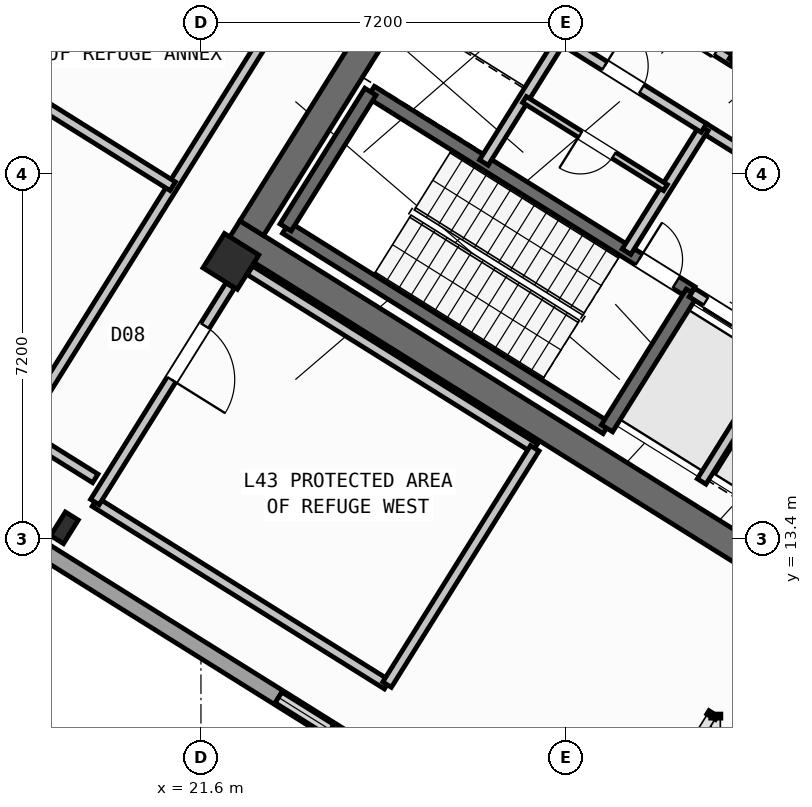
"""IFC4 building model, lengths in metres.
Left out: names, types, materials, properties, quantities, classifications, styles, units other than length and angle.
Written with IfcOpenShell. Run it as: python <this file> out.ifc"""

import sys

from ifc_helpers import new_model, si_unit, direction, frame, frame_2d, origin, origin_2d, place, context, subcontext, project, spatial, rectangle, hollow_rectangle, i_section, extrude, source, transform, mapped, element, fill, save


model = new_model("IFC4")
c1 = context("Model", 3, precision=1e-05, world=origin(), true_north=direction((0.0, 1.0)))
c2 = subcontext(c1, "Body", "Model", "MODEL_VIEW")
j1 = project(units=[si_unit("LENGTHUNIT", "METRE"), si_unit("PLANEANGLEUNIT", "RADIAN")], contexts=[c1])
p1 = place(None, origin())
s1 = spatial("IfcSite", under=j1, at=p1, CompositionType="ELEMENT")
p2 = place(p1, origin())
s2 = spatial("IfcBuilding", under=s1, at=p2, CompositionType="ELEMENT")
p3 = place(p2, frame((0.0, 0.0, 169.5)))
s3 = spatial("IfcBuildingStorey", under=s2, at=p3, CompositionType="ELEMENT", Elevation=169.5)
p4 = place(p3, frame((33.366, 12.477, 0.0), z_axis=(0.0, 0.0, 1.0), x_axis=(-0.848047359947, 0.529920442413, 0.0)))
e1 = element("IfcWall", 1, at=p4, inside=s3, PredefinedType="SHEAR", context=c2, shape_type="SweptSolid", body=[
    extrude(rectangle(XDim=13.14, YDim=0.55, at=frame_2d((6.57, 0.0))), origin(), (0.0, 0.0, 1.0), 5.15),
])
p5 = place(p3, frame((26.007, 24.976, 0.0), z_axis=(0.0, 0.0, 1.0), x_axis=(-0.529923795287, -0.848045264823, 0.0)))
e2 = element("IfcWall", 2, at=p5, inside=s3, PredefinedType="SHEAR", context=c2, shape_type="SweptSolid", body=[
    extrude(rectangle(XDim=6.425, YDim=0.55, at=frame_2d((3.212, 0.0))), origin(), (0.0, 0.0, 1.0), 5.15),
])
m1 = source(origin(), c2, "Body", "SweptSolid", [
    extrude(hollow_rectangle(XDim=0.8, YDim=0.8, WallThickness=0.032, at=origin_2d()), origin(), (0.0, 0.0, 1.0), 5.4),
])
p6 = place(p3, frame((22.191, 18.87, 0.0), z_axis=(0.0, 0.0, 1.0), x_axis=(-0.848048096156, 0.529919264233, 0.0)))
e3 = element("IfcColumn", 3, at=p6, inside=s3, PredefinedType="COLUMN", context=c2, shape_type="MappedRepresentation", body=[
    mapped(m1, transform((0.0, 0.0, 0.0), scale=1.0)),
])
m2 = source(origin(), c2, "Body", "SweptSolid", [
    extrude(i_section(OverallWidth=0.3, OverallDepth=0.55, WebThickness=0.015, FlangeThickness=0.029, at=origin_2d()), origin(), (0.0, 0.0, 1.0), 5.4),
])
p7 = place(p3, frame((18.906, 13.612, 0.0), z_axis=(0.0, 0.0, 1.0), x_axis=(-0.848048096156, 0.529919264233, 0.0)))
e4 = element("IfcColumn", 4, at=p7, inside=s3, PredefinedType="COLUMN", context=c2, shape_type="MappedRepresentation", body=[
    mapped(m2, transform((0.0, 0.0, 0.0), scale=1.0)),
])
p8 = place(p3, frame((29.268, 6.429, 0.0), z_axis=(0.0, 0.0, 1.0), x_axis=(-0.848049971435, 0.529916263149, 0.0)))
e5 = element("IfcWall", 5, at=p8, inside=s3, PredefinedType="STANDARD", context=c2, shape_type="SweptSolid", body=[
    extrude(rectangle(XDim=31.588, YDim=0.32, at=frame_2d((15.794, 0.0))), origin(), (0.0, 0.0, 1.0), 5.15),
])
p9 = place(p8, frame((6.007, 0.0, 0.95)))
e6 = element("IfcOpeningElement", 6, at=p9, cuts=e5, PredefinedType="OPENING", context=c2, shape_type="SweptSolid", body=[
    extrude(rectangle(XDim=1.25, YDim=1.4, at=frame_2d((0.625, 0.7))), frame((0.0, 0.17, 0.0), z_axis=(0.0, -1.0, 0.0), x_axis=(1.0, 0.0, 0.0)), (0.0, 0.0, 1.0), 0.34),
])
p10 = place(p3, frame((29.605, 15.581, 0.0), z_axis=(0.0, 0.0, 1.0), x_axis=(-0.848036911448, 0.529937163087, 0.0)))
e7 = element("IfcWall", 7, at=p10, inside=s3, PredefinedType="SHEAR", context=c2, shape_type="SweptSolid", body=[
    extrude(rectangle(XDim=7.46, YDim=0.26, at=frame_2d((3.73, 0.0))), origin(), (0.0, 0.0, 1.0), 5.15),
])
p11 = place(p3, frame((31.28, 18.261, 0.0), z_axis=(0.0, 0.0, 1.0), x_axis=(-0.848051618787, 0.529913626805, 0.0)))
e8 = element("IfcWall", 8, at=p11, inside=s3, PredefinedType="SHEAR", context=c2, shape_type="SweptSolid", body=[
    extrude(rectangle(XDim=7.46, YDim=0.26, at=frame_2d((3.73, 0.0))), origin(), (0.0, 0.0, 1.0), 5.15),
])
p12 = place(p11, frame((0.36, 0.0, 0.0)))
e9 = element("IfcOpeningElement", 9, at=p12, cuts=e8, PredefinedType="OPENING", context=c2, shape_type="SweptSolid", body=[
    extrude(rectangle(XDim=0.86, YDim=2.05, at=frame_2d((0.43, 1.025))), frame((0.0, 0.14, 0.0), z_axis=(0.0, -1.0, 0.0), x_axis=(1.0, 0.0, 0.0)), (0.0, 0.0, 1.0), 0.28),
])
p13 = place(p3, frame((31.288, 18.256, 0.0), z_axis=(0.0, 0.0, 1.0), x_axis=(-0.529943379326, -0.848033026897, 0.0)))
e10 = element("IfcWall", 10, at=p13, inside=s3, PredefinedType="SHEAR", context=c2, shape_type="SweptSolid", body=[
    extrude(rectangle(XDim=3.16, YDim=0.26, at=frame_2d((1.58, 0.0))), origin(), (0.0, 0.0, 1.0), 5.15),
])
p14 = place(p3, frame((24.945, 22.22, 0.0), z_axis=(0.0, 0.0, 1.0), x_axis=(-0.529908658664, -0.84805472316, 0.0)))
e11 = element("IfcWall", 11, at=p14, inside=s3, PredefinedType="SHEAR", context=c2, shape_type="SweptSolid", body=[
    extrude(rectangle(XDim=3.16, YDim=0.26, at=frame_2d((1.58, 0.0))), origin(), (0.0, 0.0, 1.0), 5.15),
])
p15 = place(p3, frame((38.046, 21.108, 0.0), z_axis=(0.0, 0.0, 1.0), x_axis=(-0.848054434086, 0.529909121291, 0.0)))
e12 = element("IfcWall", 12, at=p15, inside=s3, PredefinedType="SHEAR", context=c2, shape_type="SweptSolid", body=[
    extrude(rectangle(XDim=7.33, YDim=0.26, at=frame_2d((3.665, 0.0))), origin(), (0.0, 0.0, 1.0), 5.15),
])
p16 = place(p15, frame((0.22, 0.0, 0.0)))
e13 = element("IfcOpeningElement", 13, at=p16, cuts=e12, PredefinedType="OPENING", context=c2, shape_type="SweptSolid", body=[
    extrude(rectangle(XDim=1.1, YDim=2.1, at=frame_2d((0.55, 1.05))), frame((0.0, 0.14, 0.0), z_axis=(0.0, -1.0, 0.0), x_axis=(1.0, 0.0, 0.0)), (0.0, 0.0, 1.0), 0.28),
])
p17 = place(p3, frame((34.891, 16.005, 0.0), z_axis=(0.0, 0.0, 1.0), x_axis=(-0.848062873452, 0.529895614884, 0.0)))
e14 = element("IfcWall", 14, at=p17, inside=s3, PredefinedType="STANDARD", context=c2, shape_type="SweptSolid", body=[
    extrude(rectangle(XDim=4.248, YDim=0.2, at=frame_2d((2.124, 0.0))), origin(), (0.0, 0.0, 1.0), 5.14),
])
p18 = place(p17, frame((0.398, 0.0, 0.0)))
e15 = element("IfcOpeningElement", 15, at=p18, cuts=e14, PredefinedType="OPENING", context=c2, shape_type="SweptSolid", body=[
    extrude(rectangle(XDim=1.3, YDim=2.2, at=frame_2d((0.65, 1.1))), frame((0.0, 0.11, 0.0), z_axis=(0.0, -1.0, 0.0), x_axis=(1.0, 0.0, 0.0)), (0.0, 0.0, 1.0), 0.22),
])
p19 = place(p17, frame((2.473, 0.0, 0.0)))
e16 = element("IfcOpeningElement", 16, at=p19, cuts=e14, PredefinedType="OPENING", context=c2, shape_type="SweptSolid", body=[
    extrude(rectangle(XDim=1.45, YDim=2.25, at=frame_2d((0.725, 1.125))), frame((0.0, 0.11, 0.0), z_axis=(0.0, -1.0, 0.0), x_axis=(1.0, 0.0, 0.0)), (0.0, 0.0, 1.0), 0.22),
])
p20 = place(p3, frame((36.417, 18.447, 0.0), z_axis=(0.0, 0.0, 1.0), x_axis=(-0.848064879198, 0.529892404805, 0.0)))
e17 = element("IfcWall", 17, at=p20, inside=s3, PredefinedType="STANDARD", context=c2, shape_type="SweptSolid", body=[
    extrude(rectangle(XDim=5.768, YDim=0.2, at=frame_2d((2.884, 0.0))), origin(), (0.0, 0.0, 1.0), 5.14),
])
p21 = place(p20, frame((2.548, 0.0, 0.0)))
e18 = element("IfcOpeningElement", 18, at=p21, cuts=e17, PredefinedType="OPENING", context=c2, shape_type="SweptSolid", body=[
    extrude(rectangle(XDim=1.15, YDim=2.1, at=frame_2d((0.575, 1.05))), frame((0.0, 0.11, 0.0), z_axis=(0.0, -1.0, 0.0), x_axis=(1.0, 0.0, 0.0)), (0.0, 0.0, 1.0), 0.22),
])
p22 = place(p3, frame((32.108, 22.814, 0.0), z_axis=(0.0, 0.0, 1.0), x_axis=(-0.848042229521, 0.529928652696, 0.0)))
e19 = element("IfcWall", 19, at=p22, inside=s3, PredefinedType="STANDARD", context=c2, shape_type="SweptSolid", body=[
    extrude(rectangle(XDim=5.62, YDim=0.2, at=frame_2d((2.81, 0.0))), origin(), (0.0, 0.0, 1.0), 5.14),
])
p23 = place(p22, frame((0.39, 0.0, 0.0)))
e20 = element("IfcOpeningElement", 20, at=p23, cuts=e19, PredefinedType="OPENING", context=c2, shape_type="SweptSolid", body=[
    extrude(rectangle(XDim=1.1, YDim=2.15, at=frame_2d((0.55, 1.075))), frame((0.0, 0.11, 0.0), z_axis=(0.0, -1.0, 0.0), x_axis=(1.0, 0.0, 0.0)), (0.0, 0.0, 1.0), 0.22),
])
p24 = place(p22, frame((2.25, 0.0, 0.0)))
e21 = element("IfcOpeningElement", 21, at=p24, cuts=e19, PredefinedType="OPENING", context=c2, shape_type="SweptSolid", body=[
    extrude(rectangle(XDim=1.1, YDim=2.15, at=frame_2d((0.55, 1.075))), frame((0.0, 0.11, 0.0), z_axis=(0.0, -1.0, 0.0), x_axis=(1.0, 0.0, 0.0)), (0.0, 0.0, 1.0), 0.22),
])
p25 = place(p22, frame((4.11, 0.0, 0.0)))
e22 = element("IfcOpeningElement", 22, at=p25, cuts=e19, PredefinedType="OPENING", context=c2, shape_type="SweptSolid", body=[
    extrude(rectangle(XDim=1.1, YDim=2.15, at=frame_2d((0.55, 1.075))), frame((0.0, 0.11, 0.0), z_axis=(0.0, -1.0, 0.0), x_axis=(1.0, 0.0, 0.0)), (0.0, 0.0, 1.0), 0.22),
])
p26 = place(p3, frame((32.982, 24.213, 0.0), z_axis=(0.0, 0.0, 1.0), x_axis=(-0.529839334948, -0.84809803628, 0.0)))
e23 = element("IfcWall", 23, at=p26, inside=s3, PredefinedType="STANDARD", context=c2, shape_type="SweptSolid", body=[
    extrude(rectangle(XDim=1.65, YDim=0.2, at=frame_2d((0.825, 0.0))), origin(), (0.0, 0.0, 1.0), 5.14),
])
p27 = place(p3, frame((33.029, 17.003, 0.0), z_axis=(0.0, 0.0, 1.0), x_axis=(-0.529916267533, -0.848049968695, 0.0)))
e24 = element("IfcWall", 24, at=p27, inside=s3, PredefinedType="STANDARD", context=c2, shape_type="SweptSolid", body=[
    extrude(rectangle(XDim=2.92, YDim=0.2, at=frame_2d((1.46, 0.0))), origin(), (0.0, 0.0, 1.0), 5.14),
])
for number, where, z_axis, x_axis in (
    (25, (31.525, 21.504, 0.0), (0.0, 0.0, 1.0), (-0.53, -0.848, 0.0)),
    (26, (28.71, 23.263, 0.0), (0.0, 0.0, 1.0), (-0.53, -0.848, 0.0)),
):
    element("IfcWall", number, at=place(p3, frame(where, z_axis=z_axis, x_axis=x_axis)), inside=s3, PredefinedType="STANDARD", context=c2, shape_type="SweptSolid", body=[
        extrude(rectangle(XDim=2.88, YDim=0.2, at=frame_2d((1.44, 0.0))), origin(), (0.0, 0.0, 1.0), 5.14),
    ])
p28 = place(p3, frame((31.525, 21.504, 0.0), z_axis=(0.0, 0.0, 1.0), x_axis=(-0.848040211232, 0.529931882541, 0.0)))
e27 = element("IfcWall", 27, at=p28, inside=s3, PredefinedType="STANDARD", context=c2, shape_type="SweptSolid", body=[
    extrude(rectangle(XDim=6.218, YDim=0.2, at=frame_2d((3.109, 0.0))), origin(), (0.0, 0.0, 1.0), 5.14),
])
p29 = place(p28, frame((4.4, 0.0, 0.0)))
e28 = element("IfcOpeningElement", 28, at=p29, cuts=e27, PredefinedType="OPENING", context=c2, shape_type="SweptSolid", body=[
    extrude(rectangle(XDim=0.86, YDim=2.05, at=frame_2d((0.43, 1.025))), frame((0.0, 0.11, 0.0), z_axis=(0.0, -1.0, 0.0), x_axis=(1.0, 0.0, 0.0)), (0.0, 0.0, 1.0), 0.22),
])
p30 = place(p28, frame((1.45, 0.0, 0.0)))
e29 = element("IfcOpeningElement", 29, at=p30, cuts=e27, PredefinedType="OPENING", context=c2, shape_type="SweptSolid", body=[
    extrude(rectangle(XDim=0.86, YDim=2.05, at=frame_2d((0.43, 1.025))), frame((0.0, 0.11, 0.0), z_axis=(0.0, -1.0, 0.0), x_axis=(1.0, 0.0, 0.0)), (0.0, 0.0, 1.0), 0.22),
])
p31 = place(p3, frame((30.766, 20.327, 0.0), z_axis=(0.0, 0.0, 1.0), x_axis=(-0.848052663127, 0.529911955482, 0.0)))
e30 = element("IfcWall", 30, at=p31, inside=s3, PredefinedType="PLUMBINGWALL", context=c2, shape_type="SweptSolid", body=[
    extrude(rectangle(XDim=3.28, YDim=0.14, at=frame_2d((1.64, 0.0))), origin(), (0.0, 0.0, 1.0), 5.14),
])
p32 = place(p31, frame((1.2, 0.0, 0.0)))
e31 = element("IfcOpeningElement", 31, at=p32, cuts=e30, PredefinedType="OPENING", context=c2, shape_type="SweptSolid", body=[
    extrude(rectangle(XDim=0.78, YDim=2.05, at=frame_2d((0.39, 1.025))), frame((0.0, 0.08, 0.0), z_axis=(0.0, -1.0, 0.0), x_axis=(1.0, 0.0, 0.0)), (0.0, 0.0, 1.0), 0.16),
])
p33 = place(p3, frame((28.188, 15.182, 0.0), z_axis=(0.0, 0.0, 1.0), x_axis=(-0.848064515696, 0.529892986571, 0.0)))
e32 = element("IfcWall", 32, at=p33, inside=s3, PredefinedType="STANDARD", context=c2, shape_type="SweptSolid", body=[
    extrude(rectangle(XDim=6.628, YDim=0.2, at=frame_2d((3.314, 0.0))), origin(), (0.0, 0.0, 1.0), 5.14),
])
p34 = place(p3, frame((25.273, 10.517, 0.0), z_axis=(0.0, 0.0, 1.0), x_axis=(-0.848048724775, 0.529918258231, 0.0)))
e33 = element("IfcWall", 33, at=p34, inside=s3, PredefinedType="STANDARD", context=c2, shape_type="SweptSolid", body=[
    extrude(rectangle(XDim=6.8, YDim=0.2, at=frame_2d((3.4, 0.0))), origin(), (0.0, 0.0, 1.0), 5.14),
])
p35 = place(p3, frame((28.188, 15.182, 0.0), z_axis=(0.0, 0.0, 1.0), x_axis=(-0.52991514706, -0.848050668838, 0.0)))
e34 = element("IfcWall", 34, at=p35, inside=s3, PredefinedType="STANDARD", context=c2, shape_type="SweptSolid", body=[
    extrude(rectangle(XDim=5.5, YDim=0.2, at=frame_2d((2.75, 0.0))), origin(), (0.0, 0.0, 1.0), 5.14),
])
p36 = place(p3, frame((22.176, 18.393, 0.0), z_axis=(0.0, 0.0, 1.0), x_axis=(-0.529911817823, -0.848052749145, 0.0)))
e35 = element("IfcWall", 35, at=p36, inside=s3, PredefinedType="STANDARD", context=c2, shape_type="SweptSolid", body=[
    extrude(rectangle(XDim=5.038, YDim=0.2, at=frame_2d((2.519, 0.0))), origin(), (0.0, 0.0, 1.0), 4.625),
])
p37 = place(p36, frame((0.938, 0.0, 0.0)))
e36 = element("IfcOpeningElement", 36, at=p37, cuts=e35, PredefinedType="OPENING", context=c2, shape_type="SweptSolid", body=[
    extrude(rectangle(XDim=1.25, YDim=2.15, at=frame_2d((0.625, 1.075))), frame((0.0, 0.11, 0.0), z_axis=(0.0, -1.0, 0.0), x_axis=(1.0, 0.0, 0.0)), (0.0, 0.0, 1.0), 0.22),
])
p38 = place(p3, frame((19.515, 14.587, 0.0), z_axis=(0.0, 0.0, 1.0), x_axis=(-0.848076222107, 0.529874250646, 0.0)))
e37 = element("IfcWall", 37, at=p38, inside=s3, PredefinedType="STANDARD", context=c2, shape_type="SweptSolid", body=[
    extrude(rectangle(XDim=1.76, YDim=0.2, at=frame_2d((0.88, 0.0))), origin(), (0.0, 0.0, 1.0), 5.14),
])
p39 = place(p3, frame((23.666, 24.552, 0.0), z_axis=(0.0, 0.0, 1.0), x_axis=(-0.529912392506, -0.848052390049, 0.0)))
e38 = element("IfcWall", 38, at=p39, inside=s3, PredefinedType="STANDARD", context=c2, shape_type="SweptSolid", body=[
    extrude(rectangle(XDim=10.65, YDim=0.2, at=frame_2d((5.325, 0.0))), origin(), (0.0, 0.0, 1.0), 5.14),
])
p40 = place(p3, frame((19.731, 27.01, 0.0), z_axis=(0.0, 0.0, 1.0), x_axis=(-0.529896970672, -0.848062026312, 0.0)))
e39 = element("IfcWall", 39, at=p40, inside=s3, PredefinedType="STANDARD", context=c2, shape_type="SweptSolid", body=[
    extrude(rectangle(XDim=4.95, YDim=0.2, at=frame_2d((2.475, 0.0))), origin(), (0.0, 0.0, 1.0), 4.625),
])
p41 = place(p3, frame((21.043, 20.354, 0.0), z_axis=(0.0, 0.0, 1.0), x_axis=(-0.848045364107, 0.529923636401, 0.0)))
e40 = element("IfcWall", 40, at=p41, inside=s3, PredefinedType="STANDARD", context=c2, shape_type="SweptSolid", body=[
    extrude(rectangle(XDim=10.2, YDim=0.2, at=frame_2d((5.1, 0.0))), origin(), (0.0, 0.0, 1.0), 5.14),
])
m3 = source(origin(), c2, "Body", "SweptSolid", [
    extrude(rectangle(XDim=1.25, YDim=1.4, at=frame_2d((0.625, 0.7))), frame((0.0, 0.03, 0.0), z_axis=(0.0, -1.0, 0.0), x_axis=(1.0, 0.0, 0.0)), (0.0, 0.0, 1.0), 0.06),
])
p42 = place(p9, origin())
e41 = element("IfcWindow", 41, at=p42, inside=s3, PartitioningType="SINGLE_PANEL", PredefinedType="WINDOW", context=c2, shape_type="MappedRepresentation", body=[
    mapped(m3, transform((0.0, 0.0, 0.0), scale=1.0)),
])
fill(e6, e41)
m4 = source(origin(), c2, "Body", "SweptSolid", [
    extrude(rectangle(XDim=0.86, YDim=2.05, at=frame_2d((0.43, 1.025))), frame((0.0, 0.025, 0.0), z_axis=(0.0, -1.0, 0.0), x_axis=(1.0, 0.0, 0.0)), (0.0, 0.0, 1.0), 0.05),
])
p43 = place(p12, frame((0.86, 0.0, 0.0), z_axis=(0.0, 0.0, 1.0), x_axis=(-1.0, 0.0, 0.0)))
e42 = element("IfcDoor", 42, at=p43, inside=s3, OperationType="SINGLE_SWING_LEFT", PredefinedType="DOOR", context=c2, shape_type="MappedRepresentation", body=[
    mapped(m4, transform((0.0, 0.0, 0.0), scale=1.0)),
])
fill(e9, e42)
m5 = source(origin(), c2, "Body", "SweptSolid", [
    extrude(rectangle(XDim=1.45, YDim=2.25, at=frame_2d((0.725, 1.125))), frame((0.0, 0.025, 0.0), z_axis=(0.0, -1.0, 0.0), x_axis=(1.0, 0.0, 0.0)), (0.0, 0.0, 1.0), 0.05),
])
p44 = place(p19, origin())
e43 = element("IfcDoor", 43, at=p44, inside=s3, OperationType="DOUBLE_DOOR_SLIDING", PredefinedType="DOOR", context=c2, shape_type="MappedRepresentation", body=[
    mapped(m5, transform((0.0, 0.0, 0.0), scale=1.0)),
])
fill(e16, e43)
p45 = place(p30, frame((0.86, 0.0, 0.0), z_axis=(0.0, 0.0, 1.0), x_axis=(-1.0, 0.0, 0.0)))
e44 = element("IfcDoor", 44, at=p45, inside=s3, OperationType="SINGLE_SWING_LEFT", PredefinedType="DOOR", context=c2, shape_type="MappedRepresentation", body=[
    mapped(m4, transform((0.0, 0.0, 0.0), scale=1.0)),
])
fill(e29, e44)
m6 = source(origin(), c2, "Body", "SweptSolid", [
    extrude(rectangle(XDim=0.78, YDim=2.05, at=frame_2d((0.39, 1.025))), frame((0.0, 0.025, 0.0), z_axis=(0.0, -1.0, 0.0), x_axis=(1.0, 0.0, 0.0)), (0.0, 0.0, 1.0), 0.05),
])
p46 = place(p32, origin())
e45 = element("IfcDoor", 45, at=p46, inside=s3, OperationType="SINGLE_SWING_RIGHT", PredefinedType="DOOR", context=c2, shape_type="MappedRepresentation", body=[
    mapped(m6, transform((0.0, 0.0, 0.0), scale=1.0)),
])
fill(e31, e45)
m7 = source(origin(), c2, "Body", "SweptSolid", [
    extrude(rectangle(XDim=1.25, YDim=2.15, at=frame_2d((0.625, 1.075))), frame((0.0, 0.025, 0.0), z_axis=(0.0, -1.0, 0.0), x_axis=(1.0, 0.0, 0.0)), (0.0, 0.0, 1.0), 0.05),
])
p47 = place(p37, origin())
e46 = element("IfcDoor", 46, at=p47, inside=s3, OperationType="SINGLE_SWING_RIGHT", PredefinedType="DOOR", context=c2, shape_type="MappedRepresentation", body=[
    mapped(m7, transform((0.0, 0.0, 0.0), scale=1.0)),
])
fill(e36, e46)
save(model, sys.argv[1])
